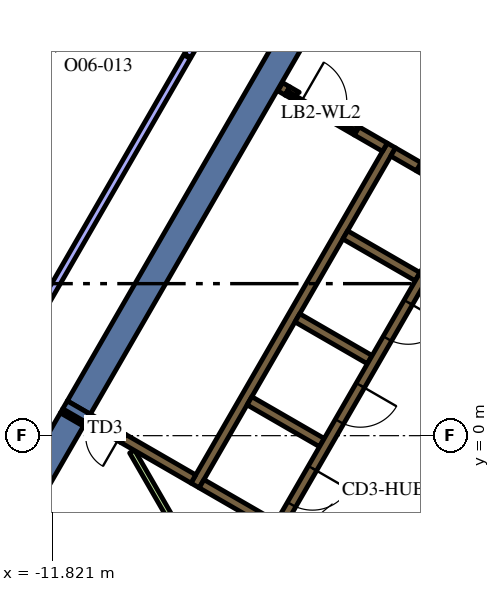
"""IFC4 building model, lengths in metres.
Left out: names, types, materials, properties, quantities, classifications, styles, units other than length and angle.
Written with IfcOpenShell. Run it as: python <this file> out.ifc"""

import sys

from ifc_helpers import new_model, si_unit, direction, frame, frame_2d, origin, place, context, subcontext, project, spatial, polyline, rectangle, outline, extrude, element, fill, save


model = new_model("IFC4")
c1 = context("Model", 3, precision=1e-05, world=origin(), true_north=direction((0.0, 1.0)))
c2 = subcontext(c1, "Body", "Model", "MODEL_VIEW")
j1 = project(units=[si_unit("LENGTHUNIT", "METRE"), si_unit("PLANEANGLEUNIT", "RADIAN")], contexts=[c1])
p1 = place(None, origin())
s1 = spatial("IfcSite", under=j1, at=p1, CompositionType="ELEMENT")
p2 = place(p1, origin())
s2 = spatial("IfcBuilding", under=s1, at=p2, CompositionType="ELEMENT")
p3 = place(p2, frame((0.0, 0.0, 205.8)))
s3 = spatial("IfcBuildingStorey", under=s2, at=p3, CompositionType="ELEMENT", Elevation=205.8)
p4 = place(p3, frame((-11.301, 0.426, 0.0), z_axis=(0.0, 0.0, 1.0), x_axis=(0.50111559984, 0.865380353138, 0.0)))
e1 = element("IfcWall", 1, at=p4, inside=s3, PredefinedType="SOLIDWALL", context=c2, shape_type="SweptSolid", body=[
    extrude(rectangle(XDim=0.121, YDim=0.7, at=frame_2d((0.061, 0.0))), origin(), (0.0, 0.0, 1.0), 4.2),
])
p5 = place(p3, frame((-15.321, -6.537, 0.0), z_axis=(0.0, 0.0, 1.0), x_axis=(0.500000268222, 0.866025248926, 0.0)))
e2 = element("IfcWall", 2, at=p5, inside=s3, PredefinedType="SOLIDWALL", context=c2, shape_type="SweptSolid", body=[
    extrude(rectangle(XDim=8.038, YDim=0.7, at=frame_2d((4.019, 0.0))), origin(), (0.0, 0.0, 1.0), 4.2),
])
p6 = place(p3, frame((-4.696, 11.867, 0.0), z_axis=(0.0, 0.0, 1.0), x_axis=(-0.500003726532, -0.866023252259, 0.0)))
e3 = element("IfcWall", 3, at=p6, inside=s3, PredefinedType="SOLIDWALL", context=c2, shape_type="SweptSolid", body=[
    extrude(rectangle(XDim=12.848, YDim=0.7, at=frame_2d((6.424, 0.0))), origin(), (0.0, 0.0, 1.0), 4.2),
])
p7 = place(p3, origin())
e4 = element("IfcWall", 4, at=p7, inside=s3, PredefinedType="SOLIDWALL", context=c2, shape_type="SweptSolid", body=[
    extrude(outline(polyline([(-11.543, 0.708), (-11.424, 0.914), (-10.843, 0.578), (-10.962, 0.372), (-11.543, 0.708)])), origin(), (0.0, 0.0, 1.0), 4.2),
])
p8 = place(p3, frame((-8.06, -1.311, 0.0), z_axis=(0.0, 0.0, 1.0), x_axis=(0.50000273126, 0.866023826885, 0.0)))
e5 = element("IfcWall", 5, at=p8, inside=s3, PredefinedType="SOLIDWALL", context=c2, shape_type="SweptSolid", body=[
    extrude(rectangle(XDim=10.33, YDim=0.25, at=frame_2d((5.165, 0.0))), origin(), (0.0, 0.0, 1.0), 4.2),
])
p9 = place(p3, frame((-1.819, 6.87, 0.0), z_axis=(0.0, 0.0, 1.0), x_axis=(-0.866294599386, 0.499533449405, 0.0)))
e6 = element("IfcWall", 6, at=p9, inside=s3, PredefinedType="SOLIDWALL", context=c2, shape_type="SweptSolid", body=[
    extrude(rectangle(XDim=0.41, YDim=0.25, at=frame_2d((0.205, 0.0))), origin(), (0.0, 0.0, 1.0), 4.2),
])
p10 = place(p3, frame((-2.849, 7.465, 0.0), z_axis=(0.0, 0.0, 1.0), x_axis=(0.865955664968, -0.500120771724, 0.0)))
e7 = element("IfcWall", 7, at=p10, inside=s3, PredefinedType="SOLIDWALL", context=c2, shape_type="SweptSolid", body=[
    extrude(rectangle(XDim=0.778, YDim=0.25, at=frame_2d((0.389, 0.0))), origin(), (0.0, 0.0, 1.0), 4.2),
])
for number, where, z_axis, x_axis in (
    (8, (-2.204, 4.182, 0.0), (0.0, 0.0, 1.0), (-0.866, 0.5, 0.0)),
    (9, (-5.369, 3.1, 0.0), (0.0, 0.0, 1.0), (0.866, -0.5, 0.0)),
    (10, (-4.724, -0.182, 0.0), (0.0, 0.0, 1.0), (-0.866, 0.5, 0.0)),
):
    element("IfcWall", number, at=place(p3, frame(where, z_axis=z_axis, x_axis=x_axis)), inside=s3, PredefinedType="SOLIDWALL", context=c2, shape_type="SweptSolid", body=[
        extrude(rectangle(XDim=2.2, YDim=0.25, at=frame_2d((1.1, 0.0))), origin(), (0.0, 0.0, 1.0), 4.2),
    ])
p11 = place(p3, frame((-7.889, -1.265, 0.0), z_axis=(0.0, 0.0, 1.0), x_axis=(0.866057815567, -0.499943856944, 0.0)))
e11 = element("IfcWall", 11, at=p11, inside=s3, PredefinedType="SOLIDWALL", context=c2, shape_type="SweptSolid", body=[
    extrude(rectangle(XDim=2.45, YDim=0.25, at=frame_2d((1.225, 0.0))), origin(), (0.0, 0.0, 1.0), 4.2),
])
p12 = place(p3, frame((-9.95, -0.075, 0.0), z_axis=(0.0, 0.0, 1.0), x_axis=(0.865962177421, -0.500109495288, 0.0)))
e12 = element("IfcWall", 12, at=p12, inside=s3, PredefinedType="SOLIDWALL", context=c2, shape_type="SweptSolid", body=[
    extrude(rectangle(XDim=2.129, YDim=0.25, at=frame_2d((1.065, 0.0))), origin(), (0.0, 0.0, 1.0), 4.2),
])
p13 = place(p3, frame((-5.629, 9.07, 0.0), z_axis=(0.0, 0.0, 1.0), x_axis=(-0.866185586049, 0.49972245349, 0.0)))
e13 = element("IfcWall", 13, at=p13, inside=s3, PredefinedType="SOLIDWALL", context=c2, shape_type="SweptSolid", body=[
    extrude(rectangle(XDim=0.22, YDim=0.25, at=frame_2d((0.11, 0.0))), origin(), (0.0, 0.0, 1.0), 4.2),
])
p14 = place(p3, frame((-3.809, 8.019, 0.0), z_axis=(0.0, 0.0, 1.0), x_axis=(0.866010229787, -0.500026281214, 0.0)))
e14 = element("IfcWall", 14, at=p14, inside=s3, PredefinedType="SOLIDWALL", context=c2, shape_type="SweptSolid", body=[
    extrude(rectangle(XDim=0.858, YDim=0.25, at=frame_2d((0.429, 0.0))), origin(), (0.0, 0.0, 1.0), 4.2),
])
e15 = element("IfcWall", 15, at=p7, inside=s3, PredefinedType="SOLIDWALL", context=c2, shape_type="SweptSolid", body=[
    extrude(outline(polyline([(-3.748, 8.128), (-3.813, 8.015), (-4.027, 8.139), (-4.017, 8.156), (-4.008, 8.173), (-4.0, 8.192), (-3.995, 8.21), (-3.991, 8.23), (-3.99, 8.25), (-3.99, 8.268), (-3.748, 8.128)])), origin(), (0.0, 0.0, 1.0), 4.2),
])
e16 = element("IfcWall", 16, at=p7, inside=s3, PredefinedType="SOLIDWALL", context=c2, shape_type="SweptSolid", body=[
    extrude(outline(polyline([(-5.689, 8.96), (-5.69, 8.961), (-5.565, 9.177), (-5.319, 9.035), (-5.335, 9.026), (-5.351, 9.015), (-5.366, 9.002), (-5.379, 8.988), (-5.392, 8.972), (-5.402, 8.956), (-5.412, 8.939), (-5.629, 9.064), (-5.629, 9.064), (-5.689, 8.96)])), origin(), (0.0, 0.0, 1.0), 4.2),
])
p15 = place(p3, frame((-9.718, -0.417, 0.0), z_axis=(0.0, 0.0, 1.0), x_axis=(0.499966538646, -0.866044721844, 0.0)))
e17 = element("IfcWall", 17, at=p15, inside=s3, PredefinedType="PARTITIONING", context=c2, shape_type="SweptSolid", body=[
    extrude(rectangle(XDim=2.511, YDim=0.15, at=frame_2d((1.255, 0.0))), origin(), (0.0, 0.0, 1.0), 3.45),
])
p16 = place(p3, frame((-6.653, -2.477, 0.0), z_axis=(0.0, 0.0, 1.0), x_axis=(-0.500002592159, 0.866023907196, 0.0)))
e18 = element("IfcWall", 18, at=p16, inside=s3, PredefinedType="PARTITIONING", context=c2, shape_type="SweptSolid", body=[
    extrude(rectangle(XDim=0.503, YDim=0.15, at=frame_2d((0.251, 0.0))), origin(), (0.0, 0.0, 1.0), 3.45),
])
p17 = place(p3, frame((-0.898, 6.194, 0.0), z_axis=(0.0, 0.0, 1.0), x_axis=(-0.499996202215, -0.866027596426, 0.0)))
e19 = element("IfcWall", 19, at=p17, inside=s3, PredefinedType="SOLIDWALL", context=c2, shape_type="SweptSolid", body=[
    extrude(rectangle(XDim=9.83, YDim=0.25, at=frame_2d((4.915, 0.0))), origin(), (0.0, 0.0, 1.0), 4.2),
])
p18 = place(p17, frame((0.585, 0.0, 0.0)))
e20 = element("IfcOpeningElement", 20, at=p18, cuts=e19, PredefinedType="OPENING", context=c2, shape_type="SweptSolid", body=[
    extrude(rectangle(XDim=1.1, YDim=2.1, at=frame_2d((0.55, 1.05))), frame((0.0, 0.135, 0.0), z_axis=(0.0, -1.0, 0.0), x_axis=(1.0, 0.0, 0.0)), (0.0, 0.0, 1.0), 0.27),
])
p19 = place(p17, frame((3.105, 0.0, 0.0)))
e21 = element("IfcOpeningElement", 21, at=p19, cuts=e19, PredefinedType="OPENING", context=c2, shape_type="SweptSolid", body=[
    extrude(rectangle(XDim=1.1, YDim=2.1, at=frame_2d((0.55, 1.05))), frame((0.0, 0.135, 0.0), z_axis=(0.0, -1.0, 0.0), x_axis=(1.0, 0.0, 0.0)), (0.0, 0.0, 1.0), 0.27),
])
p20 = place(p17, frame((5.625, 0.0, 0.0)))
e22 = element("IfcOpeningElement", 22, at=p20, cuts=e19, PredefinedType="OPENING", context=c2, shape_type="SweptSolid", body=[
    extrude(rectangle(XDim=1.1, YDim=2.1, at=frame_2d((0.55, 1.05))), frame((0.0, 0.135, 0.0), z_axis=(0.0, -1.0, 0.0), x_axis=(1.0, 0.0, 0.0)), (0.0, 0.0, 1.0), 0.27),
])
p21 = place(p17, frame((8.145, 0.0, 0.0)))
e23 = element("IfcOpeningElement", 23, at=p21, cuts=e19, PredefinedType="OPENING", context=c2, shape_type="SweptSolid", body=[
    extrude(rectangle(XDim=1.1, YDim=2.1, at=frame_2d((0.55, 1.05))), frame((0.0, 0.135, 0.0), z_axis=(0.0, -1.0, 0.0), x_axis=(1.0, 0.0, 0.0)), (0.0, 0.0, 1.0), 0.27),
])
p22 = place(p3, frame((-5.659, 9.012, 0.0), z_axis=(0.0, 0.0, 1.0), x_axis=(0.866009402589, -0.500027713859, 0.0)))
e24 = element("IfcWall", 24, at=p22, inside=s3, PredefinedType="PARTITIONING", context=c2, shape_type="SweptSolid", body=[
    extrude(rectangle(XDim=2.1, YDim=0.12, at=frame_2d((1.05, 0.0))), origin(), (0.0, 0.0, 1.0), 3.45),
])
p23 = place(p22, frame((0.45, 0.0, 0.0)))
e25 = element("IfcOpeningElement", 25, at=p23, cuts=e24, PredefinedType="OPENING", context=c2, shape_type="SweptSolid", body=[
    extrude(rectangle(XDim=1.2, YDim=2.1, at=frame_2d((0.6, 1.05))), frame((0.0, 0.07, 0.0), z_axis=(0.0, -1.0, 0.0), x_axis=(1.0, 0.0, 0.0)), (0.0, 0.0, 1.0), 0.14),
])
p24 = place(p3, frame((-9.95, -0.075, 0.0), z_axis=(0.0, 0.0, 1.0), x_axis=(-0.865952669392, 0.500125958508, 0.0)))
e26 = element("IfcWall", 26, at=p24, inside=s3, PredefinedType="SOLIDWALL", context=c2, shape_type="SweptSolid", body=[
    extrude(rectangle(XDim=1.1, YDim=0.25, at=frame_2d((0.55, 0.0))), origin(), (0.0, 0.0, 1.0), 4.2),
])
p25 = place(p24, frame((0.1, 0.0, 0.0)))
e27 = element("IfcOpeningElement", 27, at=p25, cuts=e26, PredefinedType="OPENING", context=c2, shape_type="SweptSolid", body=[
    extrude(rectangle(XDim=0.9, YDim=2.1, at=frame_2d((0.45, 1.05))), frame((0.0, 0.135, 0.0), z_axis=(0.0, -1.0, 0.0), x_axis=(1.0, 0.0, 0.0)), (0.0, 0.0, 1.0), 0.27),
])
p26 = place(p3, frame((-13.635, 7.959, 0.0), z_axis=(0.0, 0.0, 1.0), x_axis=(0.518788941184, 0.854902353784, 0.0)))
e28 = element("IfcWall", 28, at=p26, inside=s3, PredefinedType="PARTITIONING", context=c2, shape_type="SweptSolid", body=[
    extrude(rectangle(XDim=6.129, YDim=0.15, at=frame_2d((3.064, 0.0))), origin(), (0.0, 0.0, 1.0), 3.45),
])
p27 = place(p26, frame((2.629, 0.0, 0.0)))
e29 = element("IfcOpeningElement", 29, at=p27, cuts=e28, PredefinedType="OPENING", context=c2, shape_type="SweptSolid", body=[
    extrude(rectangle(XDim=0.9, YDim=2.1, at=frame_2d((0.45, 1.05))), frame((0.0, 0.085, 0.0), z_axis=(0.0, -1.0, 0.0), x_axis=(1.0, 0.0, 0.0)), (0.0, 0.0, 1.0), 0.17),
])
p28 = place(p3, frame((-8.272, 9.972, 0.0), z_axis=(0.0, 0.0, 1.0), x_axis=(-0.5000018851, -0.866024315419, 0.0)))
e30 = element("IfcWall", 30, at=p28, inside=s3, PredefinedType="PARTITIONING", context=c2, shape_type="SweptSolid", body=[
    extrude(rectangle(XDim=9.0, YDim=0.2, at=frame_2d((4.5, 0.0))), origin(), (0.0, 0.0, 1.0), 3.45),
])
p29 = place(p3, frame((-4.148, 17.115, 0.0), z_axis=(0.0, 0.0, 1.0), x_axis=(-0.499983057696, -0.866035185207, 0.0)))
e31 = element("IfcWall", 31, at=p29, inside=s3, PredefinedType="PARTITIONING", context=c2, shape_type="SweptSolid", body=[
    extrude(rectangle(XDim=8.218, YDim=0.2, at=frame_2d((4.109, 0.0))), origin(), (0.0, 0.0, 1.0), 3.45),
])
p30 = place(p19, origin())
e32 = element("IfcDoor", 32, at=p30, inside=s3, OperationType="DOUBLE_DOOR_SLIDING", PredefinedType="DOOR", context=c2, shape_type="SweptSolid", body=[
    extrude(rectangle(XDim=1.1, YDim=2.1, at=frame_2d((0.55, 1.05))), frame((0.0, 0.025, 0.0), z_axis=(0.0, -1.0, 0.0), x_axis=(1.0, 0.0, 0.0)), (0.0, 0.0, 1.0), 0.05),
])
fill(e21, e32)
p31 = place(p20, origin())
e33 = element("IfcDoor", 33, at=p31, inside=s3, OperationType="DOUBLE_DOOR_SLIDING", PredefinedType="DOOR", context=c2, shape_type="SweptSolid", body=[
    extrude(rectangle(XDim=1.1, YDim=2.1, at=frame_2d((0.55, 1.05))), frame((0.0, 0.025, 0.0), z_axis=(0.0, -1.0, 0.0), x_axis=(1.0, 0.0, 0.0)), (0.0, 0.0, 1.0), 0.05),
])
fill(e22, e33)
p32 = place(p21, origin())
e34 = element("IfcDoor", 34, at=p32, inside=s3, OperationType="DOUBLE_DOOR_SLIDING", PredefinedType="DOOR", context=c2, shape_type="SweptSolid", body=[
    extrude(rectangle(XDim=1.1, YDim=2.1, at=frame_2d((0.55, 1.05))), frame((0.0, 0.025, 0.0), z_axis=(0.0, -1.0, 0.0), x_axis=(1.0, 0.0, 0.0)), (0.0, 0.0, 1.0), 0.05),
])
fill(e23, e34)
p33 = place(p23, origin())
e35 = element("IfcDoor", 35, at=p33, inside=s3, OperationType="SINGLE_SWING_LEFT", PredefinedType="DOOR", context=c2, shape_type="SweptSolid", body=[
    extrude(rectangle(XDim=1.2, YDim=2.1, at=frame_2d((0.6, 1.05))), frame((0.0, 0.025, 0.0), z_axis=(0.0, -1.0, 0.0), x_axis=(1.0, 0.0, 0.0)), (0.0, 0.0, 1.0), 0.05),
])
fill(e25, e35)
p34 = place(p25, origin())
e36 = element("IfcDoor", 36, at=p34, inside=s3, OperationType="SINGLE_SWING_LEFT", PredefinedType="DOOR", context=c2, shape_type="SweptSolid", body=[
    extrude(rectangle(XDim=0.9, YDim=2.1, at=frame_2d((0.45, 1.05))), frame((0.0, 0.025, 0.0), z_axis=(0.0, -1.0, 0.0), x_axis=(1.0, 0.0, 0.0)), (0.0, 0.0, 1.0), 0.05),
])
fill(e27, e36)
save(model, sys.argv[1])
